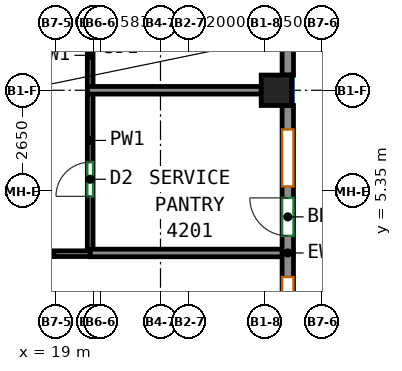
"""IFC4 building model, lengths in metres.
Left out: names, types, materials, properties, quantities, classifications, styles, units other than length and angle.
Written with IfcOpenShell. Run it as: python <this file> out.ifc"""

import sys

from ifc_helpers import new_model, si_unit, direction, frame, frame_2d, origin, origin_2d, place, context, subcontext, project, spatial, rectangle, extrude, source, transform, mapped, element, fill, save


model = new_model("IFC4")
c1 = context("Model", 3, precision=1e-05, world=origin(), true_north=direction((0.0, 1.0)))
c2 = subcontext(c1, "Body", "Model", "MODEL_VIEW")
j1 = project(units=[si_unit("LENGTHUNIT", "METRE"), si_unit("PLANEANGLEUNIT", "RADIAN")], contexts=[c1])
p1 = place(None, origin())
s1 = spatial("IfcSite", under=j1, at=p1, CompositionType="ELEMENT")
p2 = place(p1, origin())
s2 = spatial("IfcBuilding", under=s1, at=p2, CompositionType="ELEMENT")
p3 = place(p2, frame((0.0, 0.0, 178.7)))
s3 = spatial("IfcBuildingStorey", under=s2, at=p3, CompositionType="ELEMENT", Elevation=178.7)
m1 = source(origin(), c2, "Body", "SweptSolid", [
    extrude(rectangle(XDim=0.8, YDim=0.8, at=origin_2d()), origin(), (0.0, 0.0, 1.0), 3.12),
])
p4 = place(p3, frame((24.8, 8.0, 0.0), z_axis=(0.0, 0.0, 1.0), x_axis=(1.0, 0.0, 0.0)))
e1 = element("IfcColumn", 1, at=p4, inside=s3, PredefinedType="COLUMN", context=c2, shape_type="MappedRepresentation", body=[
    mapped(m1, transform((0.0, 0.0, 0.0))),
])
m2 = source(origin(), c2, "Body", "SweptSolid", [
    extrude(rectangle(XDim=7.763, YDim=0.3, at=frame_2d((3.881, 0.0))), origin(), (0.0, 0.0, 1.0), 3.12),
])
p5 = place(p3, frame((25.1, -0.163, 0.0), z_axis=(0.0, 0.0, 1.0), x_axis=(0.0, 1.0, 0.0)))
e2 = element("IfcWall", 2, at=p5, inside=s3, PredefinedType="SOLIDWALL", context=c2, shape_type="MappedRepresentation", body=[
    mapped(m2, transform((0.0, 0.0, 0.0))),
])
p6 = place(p5, frame((1.75, 0.0, 0.85)))
e3 = element("IfcOpeningElement", 3, at=p6, cuts=e2, PredefinedType="OPENING", context=c2, shape_type="SweptSolid", body=[
    extrude(rectangle(XDim=1.5, YDim=1.95, at=frame_2d((0.75, 0.975))), frame((0.0, 0.16, 0.0), z_axis=(0.0, -1.0, 0.0), x_axis=(1.0, 0.0, 0.0)), (0.0, 0.0, 1.0), 0.32),
])
p7 = place(p5, frame((0.45, 0.0, 0.0)))
e4 = element("IfcOpeningElement", 4, at=p7, cuts=e2, PredefinedType="OPENING", context=c2, shape_type="SweptSolid", body=[
    extrude(rectangle(XDim=1.0, YDim=2.1, at=frame_2d((0.5, 1.05))), frame((0.0, 0.16, 0.0), z_axis=(0.0, -1.0, 0.0), x_axis=(1.0, 0.0, 0.0)), (0.0, 0.0, 1.0), 0.32),
])
p8 = place(p5, frame((5.631, 0.0, 0.85)))
e5 = element("IfcOpeningElement", 5, at=p8, cuts=e2, PredefinedType="OPENING", context=c2, shape_type="SweptSolid", body=[
    extrude(rectangle(XDim=1.5, YDim=1.95, at=frame_2d((0.75, 0.975))), frame((0.0, 0.16, 0.0), z_axis=(0.0, -1.0, 0.0), x_axis=(1.0, 0.0, 0.0)), (0.0, 0.0, 1.0), 0.32),
])
p9 = place(p5, frame((4.331, 0.0, 0.0)))
e6 = element("IfcOpeningElement", 6, at=p9, cuts=e2, PredefinedType="OPENING", context=c2, shape_type="SweptSolid", body=[
    extrude(rectangle(XDim=1.0, YDim=2.1, at=frame_2d((0.5, 1.05))), frame((0.0, 0.16, 0.0), z_axis=(0.0, -1.0, 0.0), x_axis=(1.0, 0.0, 0.0)), (0.0, 0.0, 1.0), 0.32),
])
m3 = source(origin(), c2, "Body", "SweptSolid", [
    extrude(rectangle(XDim=13.95, YDim=0.3, at=frame_2d((6.975, 0.0))), origin(), (0.0, 0.0, 1.0), 3.12),
])
p10 = place(p3, frame((25.1, 8.4, 0.0), z_axis=(0.0, 0.0, 1.0), x_axis=(0.0, 1.0, 0.0)))
e7 = element("IfcWall", 7, at=p10, inside=s3, PredefinedType="SOLIDWALL", context=c2, shape_type="MappedRepresentation", body=[
    mapped(m3, transform((0.0, 0.0, 0.0))),
])
p11 = place(p10, frame((0.994, 0.0, 0.85)))
e8 = element("IfcOpeningElement", 8, at=p11, cuts=e7, PredefinedType="OPENING", context=c2, shape_type="SweptSolid", body=[
    extrude(rectangle(XDim=1.5, YDim=1.95, at=frame_2d((0.75, 0.975))), frame((0.0, 0.16, 0.0), z_axis=(0.0, -1.0, 0.0), x_axis=(1.0, 0.0, 0.0)), (0.0, 0.0, 1.0), 0.32),
])
p12 = place(p10, frame((4.481, 0.0, 0.85)))
e9 = element("IfcOpeningElement", 9, at=p12, cuts=e7, PredefinedType="OPENING", context=c2, shape_type="SweptSolid", body=[
    extrude(rectangle(XDim=1.5, YDim=1.95, at=frame_2d((0.75, 0.975))), frame((0.0, 0.16, 0.0), z_axis=(0.0, -1.0, 0.0), x_axis=(1.0, 0.0, 0.0)), (0.0, 0.0, 1.0), 0.32),
])
p13 = place(p10, frame((7.969, 0.0, 0.85)))
e10 = element("IfcOpeningElement", 10, at=p13, cuts=e7, PredefinedType="OPENING", context=c2, shape_type="SweptSolid", body=[
    extrude(rectangle(XDim=1.5, YDim=1.95, at=frame_2d((0.75, 0.975))), frame((0.0, 0.16, 0.0), z_axis=(0.0, -1.0, 0.0), x_axis=(1.0, 0.0, 0.0)), (0.0, 0.0, 1.0), 0.32),
])
p14 = place(p10, frame((11.456, 0.0, 0.85)))
e11 = element("IfcOpeningElement", 11, at=p14, cuts=e7, PredefinedType="OPENING", context=c2, shape_type="SweptSolid", body=[
    extrude(rectangle(XDim=1.5, YDim=1.95, at=frame_2d((0.75, 0.975))), frame((0.0, 0.16, 0.0), z_axis=(0.0, -1.0, 0.0), x_axis=(1.0, 0.0, 0.0)), (0.0, 0.0, 1.0), 0.32),
])
p15 = place(p3, frame((19.9, 3.809, 0.0), z_axis=(0.0, 0.0, 1.0), x_axis=(0.0, 1.0, 0.0)))
e12 = element("IfcWall", 12, at=p15, inside=s3, PredefinedType="PARTITIONING", context=c2, shape_type="SweptSolid", body=[
    extrude(rectangle(XDim=4.101, YDim=0.15, at=frame_2d((2.05, 0.0))), origin(), (0.0, 0.0, 1.0), 3.12),
])
p16 = place(p15, frame((1.4, 0.0, 0.0)))
e13 = element("IfcOpeningElement", 13, at=p16, cuts=e12, PredefinedType="OPENING", context=c2, shape_type="SweptSolid", body=[
    extrude(rectangle(XDim=0.9, YDim=2.1, at=frame_2d((0.45, 1.05))), frame((0.0, 0.085, 0.0), z_axis=(0.0, -1.0, 0.0), x_axis=(1.0, 0.0, 0.0)), (0.0, 0.0, 1.0), 0.17),
])
p17 = place(p3, frame((19.9, 8.09, 0.0), z_axis=(0.0, 0.0, 1.0), x_axis=(0.0, 1.0, 0.0)))
e14 = element("IfcWall", 14, at=p17, inside=s3, PredefinedType="PARTITIONING", context=c2, shape_type="SweptSolid", body=[
    extrude(rectangle(XDim=1.66, YDim=0.15, at=frame_2d((0.83, 0.0))), origin(), (0.0, 0.0, 1.0), 3.12),
])
p18 = place(p3, frame((17.884, 3.7, 0.0), z_axis=(0.0, 0.0, 1.0), x_axis=(1.0, 0.0, 0.0)))
e15 = element("IfcWall", 15, at=p18, inside=s3, PredefinedType="PARTITIONING", context=c2, shape_type="SweptSolid", body=[
    extrude(rectangle(XDim=2.016, YDim=0.15, at=frame_2d((1.008, 0.0))), origin(), (0.0, 0.0, 1.0), 3.12),
])
p19 = place(p3, frame((19.827, 8.0, 0.0), z_axis=(0.0, 0.0, 1.0), x_axis=(1.0, 0.0, 0.0)))
e16 = element("IfcWall", 16, at=p19, inside=s3, PredefinedType="PARTITIONING", context=c2, shape_type="SweptSolid", body=[
    extrude(rectangle(XDim=4.573, YDim=0.2, at=frame_2d((2.287, 0.0))), origin(), (0.0, 0.0, 1.0), 3.12),
])
p20 = place(p3, frame((19.902, 3.719, 0.0), z_axis=(0.0, 0.0, 1.0), x_axis=(1.0, 0.0, 0.0)))
e17 = element("IfcWall", 17, at=p20, inside=s3, PredefinedType="PARTITIONING", context=c2, shape_type="SweptSolid", body=[
    extrude(rectangle(XDim=5.098, YDim=0.2, at=frame_2d((2.549, 0.0))), origin(), (0.0, 0.0, 1.0), 3.12),
])
p21 = place(p6, origin())
e18 = element("IfcWindow", 18, at=p21, inside=s3, PartitioningType="SINGLE_PANEL", PredefinedType="WINDOW", context=c2, shape_type="SweptSolid", body=[
    extrude(rectangle(XDim=1.5, YDim=1.95, at=frame_2d((0.75, 0.975))), frame((0.0, 0.03, 0.0), z_axis=(0.0, -1.0, 0.0), x_axis=(1.0, 0.0, 0.0)), (0.0, 0.0, 1.0), 0.06),
])
fill(e3, e18)
p22 = place(p8, origin())
e19 = element("IfcWindow", 19, at=p22, inside=s3, PartitioningType="SINGLE_PANEL", PredefinedType="WINDOW", context=c2, shape_type="SweptSolid", body=[
    extrude(rectangle(XDim=1.5, YDim=1.95, at=frame_2d((0.75, 0.975))), frame((0.0, 0.03, 0.0), z_axis=(0.0, -1.0, 0.0), x_axis=(1.0, 0.0, 0.0)), (0.0, 0.0, 1.0), 0.06),
])
fill(e5, e19)
p23 = place(p9, origin())
e20 = element("IfcDoor", 20, at=p23, inside=s3, OperationType="SINGLE_SWING_RIGHT", PredefinedType="DOOR", context=c2, shape_type="SweptSolid", body=[
    extrude(rectangle(XDim=1.0, YDim=2.1, at=frame_2d((0.5, 1.05))), frame((0.0, 0.025, 0.0), z_axis=(0.0, -1.0, 0.0), x_axis=(1.0, 0.0, 0.0)), (0.0, 0.0, 1.0), 0.05),
])
fill(e6, e20)
p24 = place(p16, origin())
e21 = element("IfcDoor", 21, at=p24, inside=s3, OperationType="SINGLE_SWING_LEFT", PredefinedType="DOOR", context=c2, shape_type="SweptSolid", body=[
    extrude(rectangle(XDim=0.9, YDim=2.1, at=frame_2d((0.45, 1.05))), frame((0.0, 0.025, 0.0), z_axis=(0.0, -1.0, 0.0), x_axis=(1.0, 0.0, 0.0)), (0.0, 0.0, 1.0), 0.05),
])
fill(e13, e21)
save(model, sys.argv[1])
